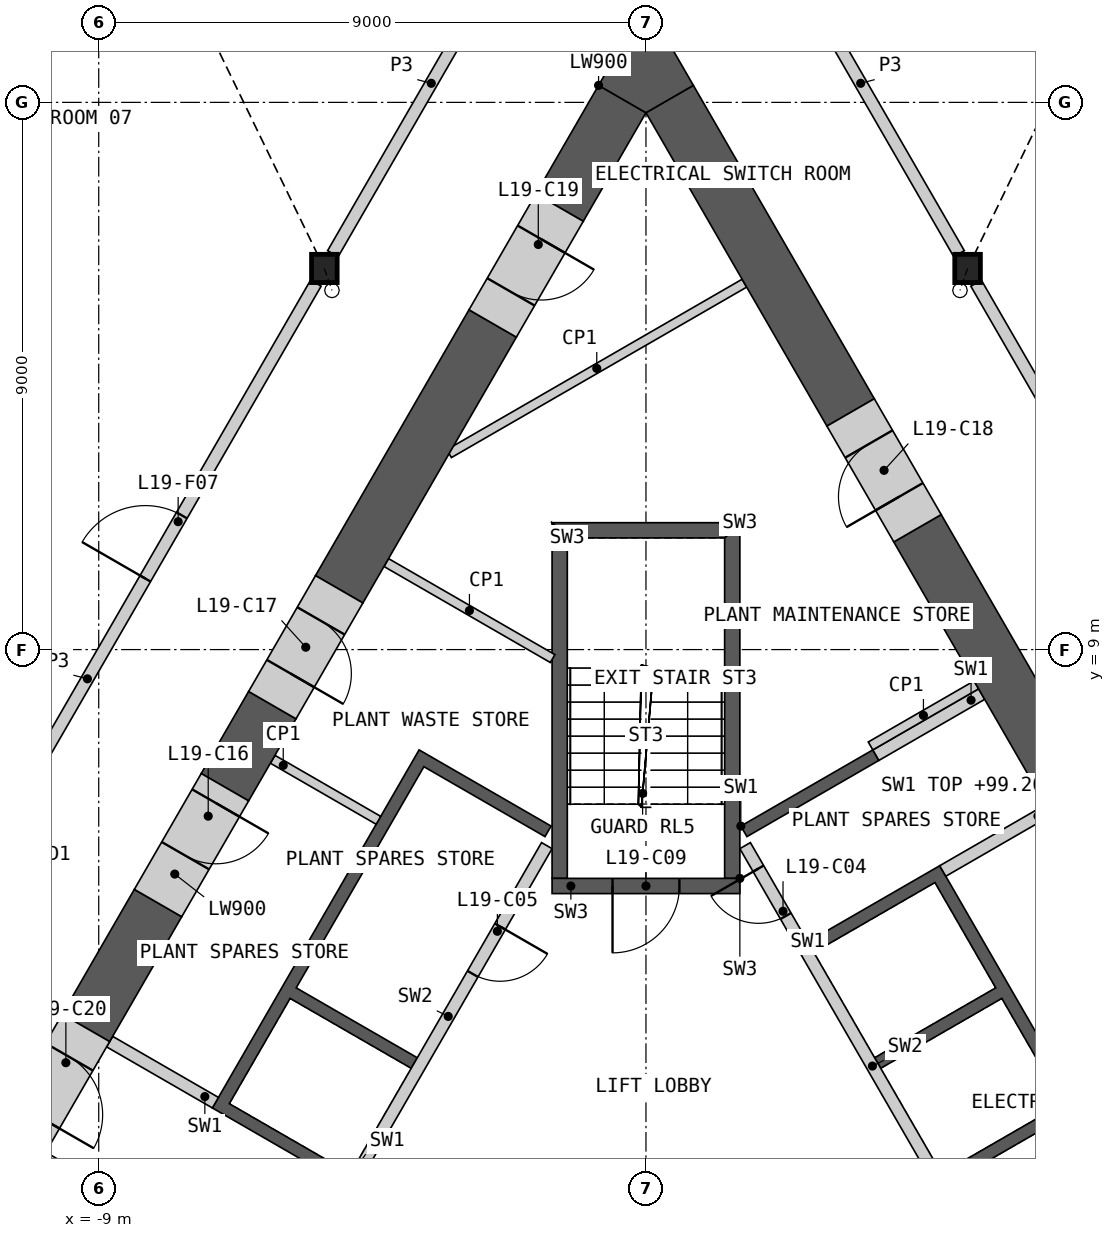
"""IFC4 building model, lengths in metres.
Left out: names, types, materials, properties, quantities, classifications, styles, units other than length and angle.
Written with IfcOpenShell. Run it as: python <this file> out.ifc"""

import sys

from ifc_helpers import new_model, si_unit, direction, frame, frame_2d, origin, origin_2d, place, context, subcontext, project, spatial, polyline, rectangle, i_section, outline, extrude, element, fill, save


model = new_model("IFC4")
c1 = context("Model", 3, precision=1e-05, world=origin(), true_north=direction((0.0, 1.0)))
c2 = subcontext(c1, "Body", "Model", "MODEL_VIEW")
j1 = project(units=[si_unit("LENGTHUNIT", "METRE"), si_unit("PLANEANGLEUNIT", "RADIAN")], contexts=[c1])
p1 = place(None, origin())
s1 = spatial("IfcSite", under=j1, at=p1, CompositionType="ELEMENT")
p2 = place(p1, origin())
s2 = spatial("IfcBuilding", under=s1, at=p2, CompositionType="ELEMENT")
p3 = place(p2, frame((0.0, 0.0, 94.6)))
s3 = spatial("IfcBuildingStorey", under=s2, at=p3, CompositionType="ELEMENT", Elevation=94.6)
for number, where, z_axis, x_axis in (
    (1, (-5.289, 15.269, 0.0), (0.025, -0.072, 0.997), (0.945, 0.327, 0.0)),
    (2, (5.289, 15.269, 0.0), (-0.025, -0.072, 0.997), (0.945, -0.327, 0.0)),
):
    element("IfcColumn", number, at=place(p3, frame(where, z_axis=z_axis, x_axis=x_axis)), inside=s3, PredefinedType="COLUMN", context=c2, shape_type="SweptSolid", body=[
        extrude(i_section(OverallWidth=0.421, OverallDepth=0.465, WebThickness=0.045, FlangeThickness=0.072, at=origin_2d()), frame((0.0, 0.0, 0.018)), (0.0, 0.0, 1.0), 4.979),
    ])
p4 = place(p3, origin())
e3 = element("IfcWall", 3, at=p4, inside=s3, PredefinedType="SHEAR", context=c2, shape_type="SweptSolid", body=[
    extrude(outline(polyline([(1.561, 6.097), (3.731, 7.35), (3.831, 7.177), (1.66, 5.924), (1.561, 6.097)])), origin(), (0.0, 0.0, 1.0), 4.6),
])
p5 = place(p3, origin())
e4 = element("IfcWall", 4, at=p5, inside=s3, PredefinedType="SHEAR", context=c2, shape_type="SweptSolid", body=[
    extrude(outline(polyline([(2.66, 4.192), (4.831, 5.445), (8.231, -0.444), (6.061, -1.697), (5.96, -1.524), (7.952, -0.374), (6.952, 1.358), (4.96, 0.208), (4.861, 0.381), (6.852, 1.531), (5.852, 3.263), (3.861, 2.113), (3.76, 2.287), (5.752, 3.437), (4.752, 5.169), (2.76, 4.019), (2.66, 4.192)])), origin(), (0.0, 0.0, 1.0), 4.6),
])
p6 = place(p3, frame((5.817, -1.476, 0.0), z_axis=(0.0, 0.0, 1.0), x_axis=(-0.500002616675, 0.866023893041, 0.0)))
e5 = element("IfcWall", 5, at=p6, inside=s3, PredefinedType="SOLIDWALL", context=c2, shape_type="SweptSolid", body=[
    extrude(rectangle(XDim=8.373, YDim=0.2, at=frame_2d((4.187, 0.0))), origin(), (0.0, 0.0, 1.0), 4.6),
])
p7 = place(p6, frame((7.037, 0.0, 0.0)))
e6 = element("IfcOpeningElement", 6, at=p7, cuts=e5, PredefinedType="OPENING", context=c2, shape_type="SweptSolid", body=[
    extrude(rectangle(XDim=0.9, YDim=2.1, at=frame_2d((0.45, 1.05))), frame((0.0, 0.11, 0.0), z_axis=(0.0, -1.0, 0.0), x_axis=(1.0, 0.0, 0.0)), (0.0, 0.0, 1.0), 0.22),
])
p8 = place(p3, frame((4.881, 5.358, 0.0), z_axis=(0.0, 0.0, 1.0), x_axis=(0.866035824272, 0.499981950752, 0.0)))
e7 = element("IfcWall", 7, at=p8, inside=s3, PredefinedType="SHEAR", context=c2, shape_type="SweptSolid", body=[
    extrude(rectangle(XDim=2.009, YDim=0.2, at=frame_2d((1.004, 0.0))), origin(), (0.0, 0.0, 1.0), 4.6),
])
p9 = place(p3, frame((3.781, 7.263, 0.0), z_axis=(0.0, 0.0, 1.0), x_axis=(0.865983199114, 0.50007309351, 0.0)))
e8 = element("IfcWall", 8, at=p9, inside=s3, PredefinedType="SHEAR", context=c2, shape_type="SweptSolid", body=[
    extrude(rectangle(XDim=2.009, YDim=0.2, at=frame_2d((1.004, 0.0))), origin(), (0.0, 0.0, 1.0), 4.6),
])
p10 = place(p3, origin())
e9 = element("IfcWall", 9, at=p10, inside=s3, PredefinedType="SHEAR", context=c2, shape_type="SweptSolid", body=[
    extrude(outline(polyline([(-4.96, 0.208), (-7.131, 1.461), (-3.731, 7.35), (-1.561, 6.097), (-1.66, 5.924), (-3.652, 7.074), (-5.752, 3.437), (-3.76, 2.287), (-3.861, 2.113), (-5.852, 3.263), (-6.852, 1.531), (-4.861, 0.381), (-4.96, 0.208)])), origin(), (0.0, 0.0, 1.0), 4.6),
])
p11 = place(p3, frame((-1.631, 5.776, 0.0), z_axis=(0.0, 0.0, 1.0), x_axis=(-0.499992876559, -0.866029516466, 0.0)))
e10 = element("IfcWall", 10, at=p11, inside=s3, PredefinedType="SOLIDWALL", context=c2, shape_type="SweptSolid", body=[
    extrude(rectangle(XDim=6.486, YDim=0.2, at=frame_2d((3.243, 0.0))), origin(), (0.0, 0.0, 1.0), 4.6),
])
p12 = place(p11, frame((1.537, 0.0, 0.0)))
e11 = element("IfcOpeningElement", 11, at=p12, cuts=e10, PredefinedType="OPENING", context=c2, shape_type="SweptSolid", body=[
    extrude(rectangle(XDim=0.9, YDim=2.1, at=frame_2d((0.45, 1.05))), frame((0.0, 0.11, 0.0), z_axis=(0.0, -1.0, 0.0), x_axis=(1.0, 0.0, 0.0)), (0.0, 0.0, 1.0), 0.22),
])
p13 = place(p3, frame((-7.081, 1.548, 0.0), z_axis=(0.0, 0.0, 1.0), x_axis=(-0.865983199114, 0.50007309351, 0.0)))
e12 = element("IfcWall", 12, at=p13, inside=s3, PredefinedType="SHEAR", context=c2, shape_type="SweptSolid", body=[
    extrude(rectangle(XDim=2.009, YDim=0.2, at=frame_2d((1.004, 0.0))), origin(), (0.0, 0.0, 1.0), 4.6),
])
p14 = place(p3, frame((-8.181, -0.357, 0.0), z_axis=(0.0, 0.0, 1.0), x_axis=(-0.866035824272, 0.499981950752, 0.0)))
e13 = element("IfcWall", 13, at=p14, inside=s3, PredefinedType="SHEAR", context=c2, shape_type="SweptSolid", body=[
    extrude(rectangle(XDim=2.009, YDim=0.2, at=frame_2d((1.004, 0.0))), origin(), (0.0, 0.0, 1.0), 4.6),
])
p15 = place(p3, origin())
e14 = element("IfcWall", 14, at=p15, inside=s3, PredefinedType="SHEAR", context=c2, shape_type="SweptSolid", body=[
    extrude(outline(polyline([(1.544, 5.237), (1.544, 11.087), (1.294, 10.837), (1.294, 5.237), (1.544, 5.237)])), origin(), (0.0, 0.0, 1.0), 4.6),
])
p16 = place(p3, origin())
e15 = element("IfcWall", 15, at=p16, inside=s3, PredefinedType="SHEAR", context=c2, shape_type="SweptSolid", body=[
    extrude(outline(polyline([(1.544, 11.087), (-1.544, 11.087), (-1.294, 10.837), (1.294, 10.837), (1.544, 11.087)])), origin(), (0.0, 0.0, 1.0), 4.6),
])
p17 = place(p3, origin())
e16 = element("IfcWall", 16, at=p17, inside=s3, PredefinedType="SHEAR", context=c2, shape_type="SweptSolid", body=[
    extrude(outline(polyline([(-1.294, 10.837), (-1.544, 11.087), (-1.544, 5.237), (-1.294, 5.237), (-1.294, 10.837)])), origin(), (0.0, 0.0, 1.0), 4.6),
])
p18 = place(p3, frame((1.544, 5.112, 0.0), z_axis=(0.0, 0.0, 1.0), x_axis=(-1.0, 0.0, 0.0)))
e17 = element("IfcWall", 17, at=p18, inside=s3, PredefinedType="SHEAR", context=c2, shape_type="SweptSolid", body=[
    extrude(rectangle(XDim=3.088, YDim=0.25, at=frame_2d((1.544, 0.0))), origin(), (0.0, 0.0, 1.0), 4.6),
])
p19 = place(p18, frame((0.994, 0.0, 0.0)))
e18 = element("IfcOpeningElement", 18, at=p19, cuts=e17, PredefinedType="OPENING", context=c2, shape_type="SweptSolid", body=[
    extrude(rectangle(XDim=1.1, YDim=2.1, at=frame_2d((0.55, 1.05))), frame((0.0, 0.135, 0.0), z_axis=(0.0, -1.0, 0.0), x_axis=(1.0, 0.0, 0.0)), (0.0, 0.0, 1.0), 0.27),
])
for number, where, z_axis, x_axis in (
    (19, (3.693, 7.415, 0.0), (0.0, 0.0, 1.0), (0.866, 0.5, 0.0)),
    (20, (-6.139, 7.196, 0.0), (0.0, 0.0, 1.0), (0.866, -0.5, 0.0)),
):
    element("IfcWall", number, at=place(p3, frame(where, z_axis=z_axis, x_axis=x_axis)), inside=s3, PredefinedType="PARTITIONING", context=c2, shape_type="SweptSolid", body=[
        extrude(rectangle(XDim=2.009, YDim=0.15, at=frame_2d((1.004, 0.0))), origin(), (0.0, 0.0, 1.0), 4.6),
    ])
p20 = place(p3, frame((-4.271, 10.432, 0.0), z_axis=(0.0, 0.0, 1.0), x_axis=(0.866018279777, -0.50001233894, 0.0)))
e21 = element("IfcWall", 21, at=p20, inside=s3, PredefinedType="PARTITIONING", context=c2, shape_type="SweptSolid", body=[
    extrude(rectangle(XDim=3.159, YDim=0.15, at=frame_2d((1.58, 0.0))), origin(), (0.0, 0.0, 1.0), 4.6),
])
p21 = place(p3, frame((1.619, 15.026, 0.0), z_axis=(0.0, 0.0, 1.0), x_axis=(-0.866015917575, -0.500016430238, 0.0)))
e22 = element("IfcWall", 22, at=p21, inside=s3, PredefinedType="PARTITIONING", context=c2, shape_type="SweptSolid", body=[
    extrude(rectangle(XDim=5.607, YDim=0.15, at=frame_2d((2.804, 0.0))), origin(), (0.0, 0.0, 1.0), 4.6),
])
p22 = place(p3, frame((8.16, 4.596, 0.0), z_axis=(0.0, 0.0, 1.0), x_axis=(-0.500012259336, 0.866018325738, 0.0)))
e23 = element("IfcWall", 23, at=p22, inside=s3, PredefinedType="SHEAR", context=c2, shape_type="SweptSolid", body=[
    extrude(rectangle(XDim=7.389, YDim=0.9, at=frame_2d((3.695, 0.0))), origin(), (0.0, 0.0, 1.0), 4.6),
])
p23 = place(p3, frame((3.365, 12.9, 0.0), z_axis=(0.0, 0.0, 1.0), x_axis=(-0.499981657175, 0.86603599376, 0.0)))
e24 = element("IfcWall", 24, at=p23, inside=s3, PredefinedType="SHEAR", context=c2, shape_type="SweptSolid", body=[
    extrude(rectangle(XDim=5.952, YDim=0.9, at=frame_2d((2.976, 0.0))), origin(), (0.0, 0.0, 1.0), 4.6),
])
p24 = place(p3, frame((-2.521, 14.364, 0.0), z_axis=(0.0, 0.0, 1.0), x_axis=(-0.500014099723, -0.866017263153, 0.0)))
e25 = element("IfcWall", 25, at=p24, inside=s3, PredefinedType="SHEAR", context=c2, shape_type="SweptSolid", body=[
    extrude(rectangle(XDim=5.048, YDim=0.9, at=frame_2d((2.524, 0.0))), origin(), (0.0, 0.0, 1.0), 4.6),
])
p25 = place(p3, frame((-8.024, 4.831, 0.0), z_axis=(0.0, 0.0, 1.0), x_axis=(-0.499936297302, -0.866062179431, 0.0)))
e26 = element("IfcWall", 26, at=p25, inside=s3, PredefinedType="SHEAR", context=c2, shape_type="SweptSolid", body=[
    extrude(rectangle(XDim=2.372, YDim=0.9, at=frame_2d((1.186, 0.0))), origin(), (0.0, 0.0, 1.0), 4.6),
])
p26 = place(p3, frame((-0.39, 18.055, 0.0), z_axis=(0.0, 0.0, 1.0), x_axis=(-0.500009360108, -0.866019999656, 0.0)))
e27 = element("IfcWall", 27, at=p26, inside=s3, PredefinedType="SHEAR", context=c2, shape_type="SweptSolid", body=[
    extrude(rectangle(XDim=2.062, YDim=0.9, at=frame_2d((1.031, 0.0))), origin(), (0.0, 0.0, 1.0), 4.6),
])
p27 = place(p3, frame((-6.145, 8.086, 0.0), z_axis=(0.0, 0.0, 1.0), x_axis=(-0.500047902311, -0.865997745606, 0.0)))
e28 = element("IfcWall", 28, at=p27, inside=s3, PredefinedType="SHEAR", context=c2, shape_type="SweptSolid", body=[
    extrude(rectangle(XDim=1.558, YDim=0.9, at=frame_2d((0.779, 0.0))), origin(), (0.0, 0.0, 1.0), 4.6),
])
p28 = place(p3, origin())
e29 = element("IfcWall", 29, at=p28, inside=s3, PredefinedType="SHEAR", context=c2, shape_type="SweptSolid", body=[
    extrude(outline(polyline([(-0.779, 18.28), (0.0, 19.63), (0.779, 18.28), (0.0, 17.83), (-0.779, 18.28)])), origin(), (0.0, 0.0, 1.0), 4.6),
])
p29 = place(p3, frame((-6.924, 6.737, 0.0), z_axis=(0.0, 0.0, 1.0), x_axis=(-0.50002983664, -0.866008176907, 0.0)))
e30 = element("IfcWall", 30, at=p29, inside=s3, PredefinedType="SHEAR", context=c2, shape_type="SweptSolid", body=[
    extrude(rectangle(XDim=2.2, YDim=0.9, at=frame_2d((1.1, 0.0))), origin(), (0.0, 0.0, 1.0), 4.6),
])
p30 = place(p29, frame((0.3, 0.0, 0.0)))
e31 = element("IfcOpeningElement", 31, at=p30, cuts=e30, PredefinedType="OPENING", context=c2, shape_type="SweptSolid", body=[
    extrude(rectangle(XDim=1.0, YDim=2.1, at=frame_2d((0.5, 1.05))), frame((0.0, 0.46, 0.0), z_axis=(0.0, -1.0, 0.0), x_axis=(1.0, 0.0, 0.0)), (0.0, 0.0, 1.0), 0.92),
])
p31 = place(p3, frame((-5.045, 9.992, 0.0), z_axis=(0.0, 0.0, 1.0), x_axis=(-0.499898558967, -0.866083962871, 0.0)))
e32 = element("IfcWall", 32, at=p31, inside=s3, PredefinedType="SHEAR", context=c2, shape_type="SweptSolid", body=[
    extrude(rectangle(XDim=2.2, YDim=0.9, at=frame_2d((1.1, 0.0))), origin(), (0.0, 0.0, 1.0), 4.6),
])
p32 = place(p31, frame((0.6, 0.0, 0.0)))
e33 = element("IfcOpeningElement", 33, at=p32, cuts=e32, PredefinedType="OPENING", context=c2, shape_type="SweptSolid", body=[
    extrude(rectangle(XDim=1.0, YDim=2.1, at=frame_2d((0.5, 1.05))), frame((0.0, 0.46, 0.0), z_axis=(0.0, -1.0, 0.0), x_axis=(1.0, 0.0, 0.0)), (0.0, 0.0, 1.0), 0.92),
])
p33 = place(p3, frame((4.466, 10.995, 0.0), z_axis=(0.0, 0.0, 1.0), x_axis=(-0.500077893725, 0.86598042715, 0.0)))
e34 = element("IfcWall", 34, at=p33, inside=s3, PredefinedType="SHEAR", context=c2, shape_type="SweptSolid", body=[
    extrude(rectangle(XDim=2.2, YDim=0.9, at=frame_2d((1.1, 0.0))), origin(), (0.0, 0.0, 1.0), 4.6),
])
p34 = place(p33, frame((0.6, 0.0, 0.0)))
e35 = element("IfcOpeningElement", 35, at=p34, cuts=e34, PredefinedType="OPENING", context=c2, shape_type="SweptSolid", body=[
    extrude(rectangle(XDim=1.0, YDim=2.1, at=frame_2d((0.5, 1.05))), frame((0.0, 0.46, 0.0), z_axis=(0.0, -1.0, 0.0), x_axis=(1.0, 0.0, 0.0)), (0.0, 0.0, 1.0), 0.92),
])
p35 = place(p3, frame((-1.421, 16.269, 0.0), z_axis=(0.0, 0.0, 1.0), x_axis=(-0.50002983664, -0.866008176907, 0.0)))
e36 = element("IfcWall", 36, at=p35, inside=s3, PredefinedType="SHEAR", context=c2, shape_type="SweptSolid", body=[
    extrude(rectangle(XDim=2.2, YDim=0.9, at=frame_2d((1.1, 0.0))), origin(), (0.0, 0.0, 1.0), 4.6),
])
p36 = place(p35, frame((0.6, 0.0, 0.0)))
e37 = element("IfcOpeningElement", 37, at=p36, cuts=e36, PredefinedType="OPENING", context=c2, shape_type="SweptSolid", body=[
    extrude(rectangle(XDim=1.0, YDim=2.1, at=frame_2d((0.5, 1.05))), frame((0.0, 0.46, 0.0), z_axis=(0.0, -1.0, 0.0), x_axis=(1.0, 0.0, 0.0)), (0.0, 0.0, 1.0), 0.92),
])
p37 = place(p3, frame((-9.21, 2.777, 0.0), z_axis=(0.0, 0.0, 1.0), x_axis=(-0.500077893725, -0.86598042715, 0.0)))
e38 = element("IfcWall", 38, at=p37, inside=s3, PredefinedType="SHEAR", context=c2, shape_type="SweptSolid", body=[
    extrude(rectangle(XDim=2.2, YDim=0.9, at=frame_2d((1.1, 0.0))), origin(), (0.0, 0.0, 1.0), 4.6),
])
p38 = place(p37, frame((0.55, 0.0, 0.0)))
e39 = element("IfcOpeningElement", 39, at=p38, cuts=e38, PredefinedType="OPENING", context=c2, shape_type="SweptSolid", body=[
    extrude(rectangle(XDim=1.1, YDim=2.1, at=frame_2d((0.55, 1.05))), frame((0.0, 0.46, 0.0), z_axis=(0.0, -1.0, 0.0), x_axis=(1.0, 0.0, 0.0)), (0.0, 0.0, 1.0), 0.92),
])
p39 = place(p3, frame((-10.439, 6.35, 0.0), z_axis=(0.0, 0.0, 1.0), x_axis=(0.50001002959, 0.86601961312, 0.0)))
e40 = element("IfcWall", 40, at=p39, inside=s3, PredefinedType="PARTITIONING", context=c2, shape_type="SweptSolid", body=[
    extrude(rectangle(XDim=10.019, YDim=0.2, at=frame_2d((5.009, 0.0))), origin(), (0.0, 0.0, 1.0), 4.6),
])
p40 = place(p39, frame((4.409, 0.0, 0.0)))
e41 = element("IfcOpeningElement", 41, at=p40, cuts=e40, PredefinedType="OPENING", context=c2, shape_type="SweptSolid", body=[
    extrude(rectangle(XDim=1.2, YDim=2.1, at=frame_2d((0.6, 1.05))), frame((0.0, 0.11, 0.0), z_axis=(0.0, -1.0, 0.0), x_axis=(1.0, 0.0, 0.0)), (0.0, 0.0, 1.0), 0.22),
])
p41 = place(p3, frame((5.429, 15.026, 0.0), z_axis=(0.0, 0.0, 1.0), x_axis=(0.50001002959, -0.86601961312, 0.0)))
e42 = element("IfcWall", 42, at=p41, inside=s3, PredefinedType="PARTITIONING", context=c2, shape_type="SweptSolid", body=[
    extrude(rectangle(XDim=10.019, YDim=0.2, at=frame_2d((5.009, 0.0))), origin(), (0.0, 0.0, 1.0), 4.6),
])
p42 = place(p41, frame((4.409, 0.0, 0.0)))
e43 = element("IfcOpeningElement", 43, at=p42, cuts=e42, PredefinedType="OPENING", context=c2, shape_type="SweptSolid", body=[
    extrude(rectangle(XDim=1.2, YDim=2.1, at=frame_2d((0.6, 1.05))), frame((0.0, 0.11, 0.0), z_axis=(0.0, -1.0, 0.0), x_axis=(1.0, 0.0, 0.0)), (0.0, 0.0, 1.0), 0.22),
])
for number, where, z_axis, x_axis in (
    (44, (-5.149, 15.511, 0.0), (0.0, 0.0, 1.0), (0.5, 0.866, 0.0)),
    (45, (1.913, 21.116, 0.0), (0.0, 0.0, 1.0), (0.5, -0.866, 0.0)),
):
    element("IfcWall", number, at=place(p3, frame(where, z_axis=z_axis, x_axis=x_axis)), inside=s3, PredefinedType="PARTITIONING", context=c2, shape_type="SweptSolid", body=[
        extrude(rectangle(XDim=6.473, YDim=0.2, at=frame_2d((3.236, 0.0))), origin(), (0.0, 0.0, 1.0), 4.6),
    ])
p43 = place(p7, origin())
e46 = element("IfcDoor", 46, at=p43, inside=s3, OperationType="SINGLE_SWING_RIGHT", PredefinedType="DOOR", context=c2, shape_type="SweptSolid", body=[
    extrude(rectangle(XDim=0.9, YDim=2.1, at=frame_2d((0.45, 1.05))), frame((0.0, 0.025, 0.0), z_axis=(0.0, -1.0, 0.0), x_axis=(1.0, 0.0, 0.0)), (0.0, 0.0, 1.0), 0.05),
])
fill(e6, e46)
p44 = place(p12, origin())
e47 = element("IfcDoor", 47, at=p44, inside=s3, OperationType="SINGLE_SWING_LEFT", PredefinedType="DOOR", context=c2, shape_type="SweptSolid", body=[
    extrude(rectangle(XDim=0.9, YDim=2.1, at=frame_2d((0.45, 1.05))), frame((0.0, 0.025, 0.0), z_axis=(0.0, -1.0, 0.0), x_axis=(1.0, 0.0, 0.0)), (0.0, 0.0, 1.0), 0.05),
])
fill(e11, e47)
p45 = place(p19, origin())
e48 = element("IfcDoor", 48, at=p45, inside=s3, OperationType="SINGLE_SWING_RIGHT", PredefinedType="DOOR", context=c2, shape_type="SweptSolid", body=[
    extrude(rectangle(XDim=1.1, YDim=2.1, at=frame_2d((0.55, 1.05))), frame((0.0, 0.025, 0.0), z_axis=(0.0, -1.0, 0.0), x_axis=(1.0, 0.0, 0.0)), (0.0, 0.0, 1.0), 0.05),
])
fill(e18, e48)
p46 = place(p30, origin())
e49 = element("IfcDoor", 49, at=p46, inside=s3, OperationType="SINGLE_SWING_LEFT", PredefinedType="DOOR", context=c2, shape_type="SweptSolid", body=[
    extrude(rectangle(XDim=1.0, YDim=2.1, at=frame_2d((0.5, 1.05))), frame((0.0, 0.205, 0.0), z_axis=(0.0, -1.0, 0.0), x_axis=(1.0, 0.0, 0.0)), (0.0, 0.0, 1.0), 0.05),
])
fill(e31, e49)
p47 = place(p32, origin())
e50 = element("IfcDoor", 50, at=p47, inside=s3, OperationType="SINGLE_SWING_RIGHT", PredefinedType="DOOR", context=c2, shape_type="SweptSolid", body=[
    extrude(rectangle(XDim=1.0, YDim=2.1, at=frame_2d((0.5, 1.05))), frame((0.0, 0.205, 0.0), z_axis=(0.0, -1.0, 0.0), x_axis=(1.0, 0.0, 0.0)), (0.0, 0.0, 1.0), 0.05),
])
fill(e33, e50)
p48 = place(p34, origin())
e51 = element("IfcDoor", 51, at=p48, inside=s3, OperationType="SINGLE_SWING_LEFT", PredefinedType="DOOR", context=c2, shape_type="SweptSolid", body=[
    extrude(rectangle(XDim=1.0, YDim=2.1, at=frame_2d((0.5, 1.05))), frame((0.0, 0.205, 0.0), z_axis=(0.0, -1.0, 0.0), x_axis=(1.0, 0.0, 0.0)), (0.0, 0.0, 1.0), 0.05),
])
fill(e35, e51)
p49 = place(p36, origin())
e52 = element("IfcDoor", 52, at=p49, inside=s3, OperationType="SINGLE_SWING_LEFT", PredefinedType="DOOR", context=c2, shape_type="SweptSolid", body=[
    extrude(rectangle(XDim=1.0, YDim=2.1, at=frame_2d((0.5, 1.05))), frame((0.0, 0.205, 0.0), z_axis=(0.0, -1.0, 0.0), x_axis=(1.0, 0.0, 0.0)), (0.0, 0.0, 1.0), 0.05),
])
fill(e37, e52)
p50 = place(p38, origin())
e53 = element("IfcDoor", 53, at=p50, inside=s3, OperationType="SINGLE_SWING_RIGHT", PredefinedType="DOOR", context=c2, shape_type="SweptSolid", body=[
    extrude(rectangle(XDim=1.1, YDim=2.1, at=frame_2d((0.55, 1.05))), frame((0.0, 0.205, 0.0), z_axis=(0.0, -1.0, 0.0), x_axis=(1.0, 0.0, 0.0)), (0.0, 0.0, 1.0), 0.05),
])
fill(e39, e53)
p51 = place(p40, origin())
e54 = element("IfcDoor", 54, at=p51, inside=s3, OperationType="SINGLE_SWING_LEFT", PredefinedType="DOOR", context=c2, shape_type="SweptSolid", body=[
    extrude(rectangle(XDim=1.2, YDim=2.1, at=frame_2d((0.6, 1.05))), frame((0.0, 0.025, 0.0), z_axis=(0.0, -1.0, 0.0), x_axis=(1.0, 0.0, 0.0)), (0.0, 0.0, 1.0), 0.05),
])
fill(e41, e54)
save(model, sys.argv[1])
